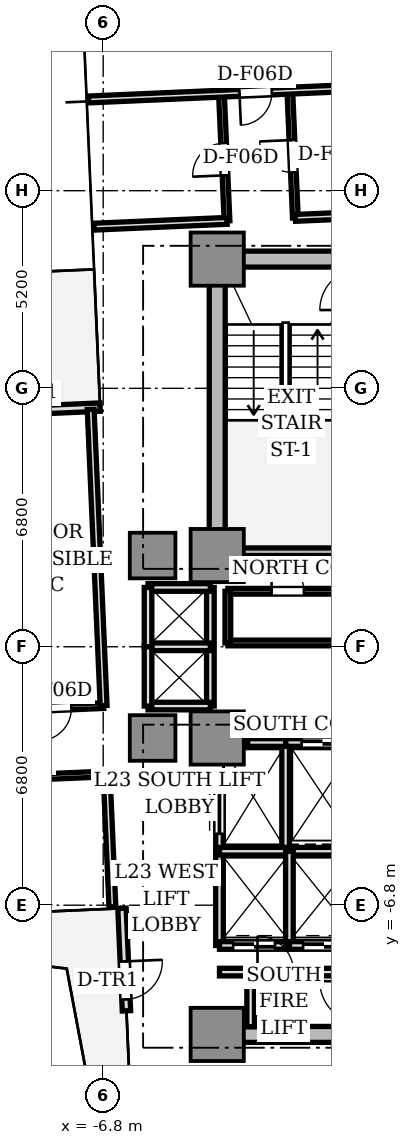
"""IFC4 building model, lengths in metres.
Left out: names, types, materials, properties, quantities, classifications, styles, units other than length and angle.
Written with IfcOpenShell. Run it as: python <this file> out.ifc"""

import sys

from ifc_helpers import new_model, si_unit, direction, frame, frame_2d, origin, origin_2d, place, context, subcontext, project, spatial, rectangle, extrude, source, transform, mapped, element, fill, save


model = new_model("IFC4")
c1 = context("Model", 3, precision=1e-05, world=origin(), true_north=direction((0.0, 1.0)))
c2 = subcontext(c1, "Body", "Model", "MODEL_VIEW")
j1 = project(units=[si_unit("LENGTHUNIT", "METRE"), si_unit("PLANEANGLEUNIT", "RADIAN")], contexts=[c1])
p1 = place(None, origin())
s1 = spatial("IfcSite", under=j1, at=p1, CompositionType="ELEMENT")
p2 = place(p1, origin())
s2 = spatial("IfcBuilding", under=s1, at=p2, CompositionType="ELEMENT")
p3 = place(p2, frame((0.0, 0.0, 86.85)))
s3 = spatial("IfcBuildingStorey", under=s2, at=p3, CompositionType="ELEMENT", Elevation=86.85)
p4 = place(p3, frame((-3.55, 10.2, 0.0), z_axis=(0.0, 0.0, 1.0), x_axis=(1.0, 0.0, 0.0)))
e1 = element("IfcWall", 1, at=p4, inside=s3, PredefinedType="SHEAR", context=c2, shape_type="SweptSolid", body=[
    extrude(rectangle(XDim=7.1, YDim=0.42, at=frame_2d((3.55, 0.0))), origin(), (0.0, 0.0, 1.0), 3.11),
])
p5 = place(p3, frame((-3.8, 2.85, 0.0), z_axis=(0.0, 0.0, 1.0), x_axis=(0.0, 1.0, 0.0)))
e2 = element("IfcWall", 2, at=p5, inside=s3, PredefinedType="SHEAR", context=c2, shape_type="SweptSolid", body=[
    extrude(rectangle(XDim=6.9, YDim=0.42, at=frame_2d((3.45, 0.0))), origin(), (0.0, 0.0, 1.0), 3.11),
])
p6 = place(p3, frame((-3.55, -10.2, 0.0), z_axis=(0.0, 0.0, 1.0), x_axis=(1.0, 0.0, 0.0)))
e3 = element("IfcWall", 3, at=p6, inside=s3, PredefinedType="SHEAR", context=c2, shape_type="SweptSolid", body=[
    extrude(rectangle(XDim=7.1, YDim=0.42, at=frame_2d((3.55, 0.0))), origin(), (0.0, 0.0, 1.0), 3.11),
])
m1 = source(origin(), c2, "Body", "SweptSolid", [
    extrude(rectangle(XDim=1.4, YDim=1.4, at=origin_2d()), origin(), (0.0, 0.0, 1.0), 3.11),
])
for number, where, z_axis, x_axis in (
    (4, (-3.8, 2.4, 0.0), (0.0, 0.0, 1.0), (1.0, 0.0, 0.0)),
    (5, (-3.8, 10.2, 0.0), (0.0, 0.0, 1.0), (1.0, 0.0, 0.0)),
    (6, (-3.8, -2.4, 0.0), (0.0, 0.0, 1.0), (1.0, 0.0, 0.0)),
    (7, (-3.8, -10.2, 0.0), (0.0, 0.0, 1.0), (1.0, 0.0, 0.0)),
):
    element("IfcColumn", number, at=place(p3, frame(where, z_axis=z_axis, x_axis=x_axis)), inside=s3, PredefinedType="COLUMN", context=c2, shape_type="MappedRepresentation", body=[
        mapped(m1, transform((0.0, 0.0, 0.0), scale=1.0)),
    ])
m2 = source(origin(), c2, "Body", "SweptSolid", [
    extrude(rectangle(XDim=1.2, YDim=1.2, at=origin_2d()), origin(), (0.0, 0.0, 1.0), 3.11),
])
for number, where, z_axis, x_axis in (
    (8, (-5.5, 2.4, 0.0), (0.0, 0.0, 1.0), (1.0, 0.0, 0.0)),
    (9, (-5.5, -2.4, 0.0), (0.0, 0.0, 1.0), (1.0, 0.0, 0.0)),
):
    element("IfcColumn", number, at=place(p3, frame(where, z_axis=z_axis, x_axis=x_axis)), inside=s3, PredefinedType="COLUMN", context=c2, shape_type="MappedRepresentation", body=[
        mapped(m2, transform((0.0, 0.0, 0.0), scale=1.0)),
    ])
p7 = place(p3, frame((-6.882, 6.306, 0.0), z_axis=(0.0, 0.0, 1.0), x_axis=(-0.999045894436, -0.043672655174, 0.0)))
e10 = element("IfcWall", 10, at=p7, inside=s3, PredefinedType="STANDARD", context=c2, shape_type="SweptSolid", body=[
    extrude(rectangle(XDim=2.7, YDim=0.22, at=frame_2d((1.35, 0.0))), origin(), (0.0, 0.0, 1.0), 3.11),
])
p8 = place(p7, frame((1.4, 0.0, 0.0)))
e11 = element("IfcOpeningElement", 11, at=p8, cuts=e10, PredefinedType="OPENING", context=c2, shape_type="SweptSolid", body=[
    extrude(rectangle(XDim=1.0, YDim=2.2, at=frame_2d((0.5, 1.1))), frame((0.0, 0.12, 0.0), z_axis=(0.0, -1.0, 0.0), x_axis=(1.0, 0.0, 0.0)), (0.0, 0.0, 1.0), 0.24),
])
p9 = place(p3, frame((-6.306, -6.882, 0.0), z_axis=(0.0, 0.0, 1.0), x_axis=(0.043672655174, -0.999045894436, 0.0)))
e12 = element("IfcWall", 12, at=p9, inside=s3, PredefinedType="STANDARD", context=c2, shape_type="SweptSolid", body=[
    extrude(rectangle(XDim=2.7, YDim=0.22, at=frame_2d((1.35, 0.0))), origin(), (0.0, 0.0, 1.0), 3.11),
])
p10 = place(p9, frame((1.4, 0.0, 0.0)))
e13 = element("IfcOpeningElement", 13, at=p10, cuts=e12, PredefinedType="OPENING", context=c2, shape_type="SweptSolid", body=[
    extrude(rectangle(XDim=1.0, YDim=2.2, at=frame_2d((0.5, 1.1))), frame((0.0, 0.12, 0.0), z_axis=(0.0, -1.0, 0.0), x_axis=(1.0, 0.0, 0.0)), (0.0, 0.0, 1.0), 0.24),
])
p11 = place(p3, frame((-3.72, 2.5, 0.0), z_axis=(0.0, 0.0, 1.0), x_axis=(1.0, 0.0, 0.0)))
e14 = element("IfcWall", 14, at=p11, inside=s3, PredefinedType="SOLIDWALL", context=c2, shape_type="SweptSolid", body=[
    extrude(rectangle(XDim=3.72, YDim=0.2, at=frame_2d((1.86, 0.0))), origin(), (0.0, 0.0, 1.0), 3.11),
])
p12 = place(p3, frame((-2.0, -5.28, 0.0), z_axis=(0.0, 0.0, 1.0), x_axis=(0.0, 1.0, 0.0)))
e15 = element("IfcWall", 15, at=p12, inside=s3, PredefinedType="SOLIDWALL", context=c2, shape_type="SweptSolid", body=[
    extrude(rectangle(XDim=2.78, YDim=0.2, at=frame_2d((1.39, 0.0))), origin(), (0.0, 0.0, 1.0), 2.66),
])
p13 = place(p3, frame((-2.0, -2.52, 0.0), z_axis=(0.0, 0.0, 1.0), x_axis=(1.0, 0.0, 0.0)))
e16 = element("IfcWall", 16, at=p13, inside=s3, PredefinedType="SOLIDWALL", context=c2, shape_type="SweptSolid", body=[
    extrude(rectangle(XDim=1.95, YDim=0.2, at=frame_2d((0.975, 0.0))), origin(), (0.0, 0.0, 1.0), 2.66),
])
p14 = place(p13, frame((0.42, 0.0, 0.0)))
e17 = element("IfcOpeningElement", 17, at=p14, cuts=e16, PredefinedType="OPENING", context=c2, shape_type="SweptSolid", body=[
    extrude(rectangle(XDim=1.1, YDim=2.2, at=frame_2d((0.55, 1.1))), frame((0.0, 0.11, 0.0), z_axis=(0.0, -1.0, 0.0), x_axis=(1.0, 0.0, 0.0)), (0.0, 0.0, 1.0), 0.22),
])
p15 = place(p3, frame((-3.0, -2.52, 0.0), z_axis=(0.0, 0.0, 1.0), x_axis=(1.0, 0.0, 0.0)))
e18 = element("IfcWall", 18, at=p15, inside=s3, PredefinedType="SOLIDWALL", context=c2, shape_type="SweptSolid", body=[
    extrude(rectangle(XDim=1.0, YDim=0.2, at=frame_2d((0.5, 0.0))), origin(), (0.0, 0.0, 1.0), 2.66),
])
p16 = place(p3, frame((-3.74, -5.36, 0.0), z_axis=(0.0, 0.0, 1.0), x_axis=(0.0, 1.0, 0.0)))
e19 = element("IfcWall", 19, at=p16, inside=s3, PredefinedType="SOLIDWALL", context=c2, shape_type="SweptSolid", body=[
    extrude(rectangle(XDim=2.08, YDim=0.2, at=frame_2d((1.04, 0.0))), origin(), (0.0, 0.0, 1.0), 2.66),
])
p17 = place(p16, frame((0.44, 0.0, 0.0)))
e20 = element("IfcOpeningElement", 20, at=p17, cuts=e19, PredefinedType="OPENING", context=c2, shape_type="SweptSolid", body=[
    extrude(rectangle(XDim=1.2, YDim=2.2, at=frame_2d((0.6, 1.1))), frame((0.0, 0.11, 0.0), z_axis=(0.0, -1.0, 0.0), x_axis=(1.0, 0.0, 0.0)), (0.0, 0.0, 1.0), 0.22),
])
p18 = place(p3, frame((-3.74, -7.86, 0.0), z_axis=(0.0, 0.0, 1.0), x_axis=(0.0, 1.0, 0.0)))
e21 = element("IfcWall", 21, at=p18, inside=s3, PredefinedType="SOLIDWALL", context=c2, shape_type="SweptSolid", body=[
    extrude(rectangle(XDim=2.48, YDim=0.2, at=frame_2d((1.24, 0.0))), origin(), (0.0, 0.0, 1.0), 2.66),
])
p19 = place(p3, frame((-3.74, -7.86, 0.0), z_axis=(0.0, 0.0, 1.0), x_axis=(1.0, 0.0, 0.0)))
e22 = element("IfcWall", 22, at=p19, inside=s3, PredefinedType="SOLIDWALL", context=c2, shape_type="SweptSolid", body=[
    extrude(rectangle(XDim=1.84, YDim=0.2, at=frame_2d((0.92, 0.0))), origin(), (0.0, 0.0, 1.0), 2.66),
])
p20 = place(p19, frame((0.36, 0.0, 0.0)))
e23 = element("IfcOpeningElement", 23, at=p20, cuts=e22, PredefinedType="OPENING", context=c2, shape_type="SweptSolid", body=[
    extrude(rectangle(XDim=1.1, YDim=2.2, at=frame_2d((0.55, 1.1))), frame((0.0, 0.11, 0.0), z_axis=(0.0, -1.0, 0.0), x_axis=(1.0, 0.0, 0.0)), (0.0, 0.0, 1.0), 0.22),
])
p21 = place(p3, frame((-3.74, -5.38, 0.0), z_axis=(0.0, 0.0, 1.0), x_axis=(1.0, 0.0, 0.0)))
e24 = element("IfcWall", 24, at=p21, inside=s3, PredefinedType="SOLIDWALL", context=c2, shape_type="SweptSolid", body=[
    extrude(rectangle(XDim=3.69, YDim=0.2, at=frame_2d((1.845, 0.0))), origin(), (0.0, 0.0, 1.0), 2.66),
])
p22 = place(p3, frame((-1.9, -7.86, 0.0), z_axis=(0.0, 0.0, 1.0), x_axis=(0.0, 1.0, 0.0)))
e25 = element("IfcWall", 25, at=p22, inside=s3, PredefinedType="SOLIDWALL", context=c2, shape_type="SweptSolid", body=[
    extrude(rectangle(XDim=2.48, YDim=0.2, at=frame_2d((1.24, 0.0))), origin(), (0.0, 0.0, 1.0), 2.66),
])
p23 = place(p3, frame((-1.9, -7.86, 0.0), z_axis=(0.0, 0.0, 1.0), x_axis=(1.0, 0.0, 0.0)))
e26 = element("IfcWall", 26, at=p23, inside=s3, PredefinedType="SOLIDWALL", context=c2, shape_type="SweptSolid", body=[
    extrude(rectangle(XDim=1.85, YDim=0.2, at=frame_2d((0.925, 0.0))), origin(), (0.0, 0.0, 1.0), 2.66),
])
p24 = place(p23, frame((0.36, 0.0, 0.0)))
e27 = element("IfcOpeningElement", 27, at=p24, cuts=e26, PredefinedType="OPENING", context=c2, shape_type="SweptSolid", body=[
    extrude(rectangle(XDim=1.1, YDim=2.2, at=frame_2d((0.55, 1.1))), frame((0.0, 0.11, 0.0), z_axis=(0.0, -1.0, 0.0), x_axis=(1.0, 0.0, 0.0)), (0.0, 0.0, 1.0), 0.22),
])
p25 = place(p3, frame((-3.98, -1.56, 0.0), z_axis=(0.0, 0.0, 1.0), x_axis=(0.0, 1.0, 0.0)))
e28 = element("IfcWall", 28, at=p25, inside=s3, PredefinedType="SOLIDWALL", context=c2, shape_type="SweptSolid", body=[
    extrude(rectangle(XDim=3.12, YDim=0.2, at=frame_2d((1.56, 0.0))), origin(), (0.0, 0.0, 1.0), 2.28),
])
for number, where, z_axis, x_axis in (
    (29, (-5.62, 1.56, 0.0), (0.0, 0.0, 1.0), (1.0, 0.0, 0.0)),
    (30, (-5.62, -1.56, 0.0), (0.0, 0.0, 1.0), (1.0, 0.0, 0.0)),
    (31, (-5.62, 0.0, 0.0), (0.0, 0.0, 1.0), (1.0, 0.0, 0.0)),
):
    element("IfcWall", number, at=place(p3, frame(where, z_axis=z_axis, x_axis=x_axis)), inside=s3, PredefinedType="SOLIDWALL", context=c2, shape_type="SweptSolid", body=[
        extrude(rectangle(XDim=1.64, YDim=0.2, at=frame_2d((0.82, 0.0))), origin(), (0.0, 0.0, 1.0), 2.66),
    ])
for number, where, z_axis, x_axis in (
    (32, (-5.62, 0.0, 0.0), (0.0, 0.0, 1.0), (0.0, 1.0, 0.0)),
    (33, (-5.62, -1.56, 0.0), (0.0, 0.0, 1.0), (0.0, 1.0, 0.0)),
):
    element("IfcWall", number, at=place(p3, frame(where, z_axis=z_axis, x_axis=x_axis)), inside=s3, PredefinedType="SOLIDWALL", context=c2, shape_type="SweptSolid", body=[
        extrude(rectangle(XDim=1.56, YDim=0.2, at=frame_2d((0.78, 0.0))), origin(), (0.0, 0.0, 1.0), 2.66),
    ])
p26 = place(p3, frame((-3.74, -8.56, 0.0), z_axis=(0.0, 0.0, 1.0), x_axis=(1.0, 0.0, 0.0)))
e34 = element("IfcWall", 34, at=p26, inside=s3, PredefinedType="SOLIDWALL", context=c2, shape_type="SweptSolid", body=[
    extrude(rectangle(XDim=3.62, YDim=0.2, at=frame_2d((1.81, 0.0))), origin(), (0.0, 0.0, 1.0), 2.66),
])
p27 = place(p26, frame((1.0, 0.0, 0.0)))
e35 = element("IfcOpeningElement", 35, at=p27, cuts=e34, PredefinedType="OPENING", context=c2, shape_type="SweptSolid", body=[
    extrude(rectangle(XDim=0.95, YDim=2.15, at=frame_2d((0.475, 1.075))), frame((0.0, 0.11, 0.0), z_axis=(0.0, -1.0, 0.0), x_axis=(1.0, 0.0, 0.0)), (0.0, 0.0, 1.0), 0.22),
])
p28 = place(p3, frame((-2.92, -10.0, 0.0), z_axis=(0.0, 0.0, 1.0), x_axis=(0.0, 1.0, 0.0)))
e36 = element("IfcWall", 36, at=p28, inside=s3, PredefinedType="SOLIDWALL", context=c2, shape_type="SweptSolid", body=[
    extrude(rectangle(XDim=1.44, YDim=0.2, at=frame_2d((0.72, 0.0))), origin(), (0.0, 0.0, 1.0), 2.66),
])
p29 = place(p3, frame((-3.52, 0.1, 0.0), z_axis=(0.0, 0.0, 1.0), x_axis=(1.0, 0.0, 0.0)))
e37 = element("IfcWall", 37, at=p29, inside=s3, PredefinedType="PARTITIONING", context=c2, shape_type="SweptSolid", body=[
    extrude(rectangle(XDim=5.68, YDim=0.15, at=frame_2d((2.84, 0.0))), origin(), (0.0, 0.0, 1.0), 2.66),
])
p30 = place(p3, frame((-3.52, 1.46, 0.0), z_axis=(0.0, 0.0, 1.0), x_axis=(1.0, 0.0, 0.0)))
e38 = element("IfcWall", 38, at=p30, inside=s3, PredefinedType="PARTITIONING", context=c2, shape_type="SweptSolid", body=[
    extrude(rectangle(XDim=5.68, YDim=0.15, at=frame_2d((2.84, 0.0))), origin(), (0.0, 0.0, 1.0), 2.66),
])
p31 = place(p30, frame((1.15, 0.0, 0.0)))
e39 = element("IfcOpeningElement", 39, at=p31, cuts=e38, PredefinedType="OPENING", context=c2, shape_type="SweptSolid", body=[
    extrude(rectangle(XDim=0.85, YDim=2.1, at=frame_2d((0.425, 1.05))), frame((0.0, 0.085, 0.0), z_axis=(0.0, -1.0, 0.0), x_axis=(1.0, 0.0, 0.0)), (0.0, 0.0, 1.0), 0.17),
])
p32 = place(p30, frame((4.15, 0.0, 0.0)))
e40 = element("IfcOpeningElement", 40, at=p32, cuts=e38, PredefinedType="OPENING", context=c2, shape_type="SweptSolid", body=[
    extrude(rectangle(XDim=0.85, YDim=2.1, at=frame_2d((0.425, 1.05))), frame((0.0, 0.085, 0.0), z_axis=(0.0, -1.0, 0.0), x_axis=(1.0, 0.0, 0.0)), (0.0, 0.0, 1.0), 0.17),
])
p33 = place(p3, frame((-3.52, 0.1, 0.0), z_axis=(0.0, 0.0, 1.0), x_axis=(0.0, 1.0, 0.0)))
e41 = element("IfcWall", 41, at=p33, inside=s3, PredefinedType="PARTITIONING", context=c2, shape_type="SweptSolid", body=[
    extrude(rectangle(XDim=1.36, YDim=0.15, at=frame_2d((0.68, 0.0))), origin(), (0.0, 0.0, 1.0), 2.28),
])
p34 = place(p3, frame((-3.542, 11.206, 0.0), z_axis=(0.0, 0.0, 1.0), x_axis=(-0.043582710367, 0.99904982226, 0.0)))
e42 = element("IfcWall", 42, at=p34, inside=s3, PredefinedType="PARTITIONING", context=c2, shape_type="SweptSolid", body=[
    extrude(rectangle(XDim=3.35, YDim=0.15, at=frame_2d((1.675, 0.0))), origin(), (0.0, 0.0, 1.0), 2.66),
])
p35 = place(p34, frame((1.2, 0.0, 0.0)))
e43 = element("IfcOpeningElement", 43, at=p35, cuts=e42, PredefinedType="OPENING", context=c2, shape_type="SweptSolid", body=[
    extrude(rectangle(XDim=0.85, YDim=2.1, at=frame_2d((0.425, 1.05))), frame((0.0, 0.085, 0.0), z_axis=(0.0, -1.0, 0.0), x_axis=(1.0, 0.0, 0.0)), (0.0, 0.0, 1.0), 0.17),
])
p36 = place(p3, frame((-1.744, 11.285, 0.0), z_axis=(0.0, 0.0, 1.0), x_axis=(-0.043579537274, 0.999049960678, 0.0)))
e44 = element("IfcWall", 44, at=p36, inside=s3, PredefinedType="PARTITIONING", context=c2, shape_type="SweptSolid", body=[
    extrude(rectangle(XDim=3.35, YDim=0.15, at=frame_2d((1.675, 0.0))), origin(), (0.0, 0.0, 1.0), 2.66),
])
p37 = place(p36, frame((1.2, 0.0, 0.0)))
e45 = element("IfcOpeningElement", 45, at=p37, cuts=e44, PredefinedType="OPENING", context=c2, shape_type="SweptSolid", body=[
    extrude(rectangle(XDim=0.85, YDim=2.1, at=frame_2d((0.425, 1.05))), frame((0.0, 0.085, 0.0), z_axis=(0.0, -1.0, 0.0), x_axis=(1.0, 0.0, 0.0)), (0.0, 0.0, 1.0), 0.17),
])
p38 = place(p3, frame((-3.542, 11.206, 0.0), z_axis=(0.0, 0.0, 1.0), x_axis=(-0.999046129111, -0.04366728647, 0.0)))
e46 = element("IfcWall", 46, at=p38, inside=s3, PredefinedType="PARTITIONING", context=c2, shape_type="SweptSolid", body=[
    extrude(rectangle(XDim=3.5, YDim=0.18, at=frame_2d((1.75, 0.0))), origin(), (0.0, 0.0, 1.0), 2.66),
])
p39 = place(p3, frame((6.049, 11.625, 0.0), z_axis=(0.0, 0.0, 1.0), x_axis=(-0.999047634936, -0.043632821702, 0.0)))
e47 = element("IfcWall", 47, at=p39, inside=s3, PredefinedType="PARTITIONING", context=c2, shape_type="SweptSolid", body=[
    extrude(rectangle(XDim=7.8, YDim=0.18, at=frame_2d((3.9, 0.0))), origin(), (0.0, 0.0, 1.0), 2.66),
])
p40 = place(p3, frame((5.903, 14.972, 0.0), z_axis=(0.0, 0.0, 1.0), x_axis=(-0.999048653727, -0.043609488494, 0.0)))
e48 = element("IfcWall", 48, at=p40, inside=s3, PredefinedType="PARTITIONING", context=c2, shape_type="SweptSolid", body=[
    extrude(rectangle(XDim=13.1, YDim=0.18, at=frame_2d((6.55, 0.0))), origin(), (0.0, 0.0, 1.0), 2.66),
])
p41 = place(p40, frame((8.275, 0.0, 0.0)))
e49 = element("IfcOpeningElement", 49, at=p41, cuts=e48, PredefinedType="OPENING", context=c2, shape_type="SweptSolid", body=[
    extrude(rectangle(XDim=0.85, YDim=2.1, at=frame_2d((0.425, 1.05))), frame((0.0, 0.1, 0.0), z_axis=(0.0, -1.0, 0.0), x_axis=(1.0, 0.0, 0.0)), (0.0, 0.0, 1.0), 0.2),
])
p42 = place(p3, frame((-6.71, -3.346, 0.0), z_axis=(0.0, 0.0, 1.0), x_axis=(-0.999048535483, -0.04361219725, 0.0)))
e50 = element("IfcWall", 50, at=p42, inside=s3, PredefinedType="PARTITIONING", context=c2, shape_type="SweptSolid", body=[
    extrude(rectangle(XDim=13.2, YDim=0.15, at=frame_2d((6.6, 0.0))), origin(), (0.0, 0.0, 1.0), 2.63),
])
p43 = place(p42, frame((1.967, 0.0, 0.0)))
e51 = element("IfcOpeningElement", 51, at=p43, cuts=e50, PredefinedType="OPENING", context=c2, shape_type="SweptSolid", body=[
    extrude(rectangle(XDim=0.85, YDim=2.1, at=frame_2d((0.425, 1.05))), frame((0.0, 0.085, 0.0), z_axis=(0.0, -1.0, 0.0), x_axis=(1.0, 0.0, 0.0)), (0.0, 0.0, 1.0), 0.17),
])
p44 = place(p42, frame((7.342, 0.0, 0.0)))
e52 = element("IfcOpeningElement", 52, at=p44, cuts=e50, PredefinedType="OPENING", context=c2, shape_type="SweptSolid", body=[
    extrude(rectangle(XDim=0.85, YDim=2.1, at=frame_2d((0.425, 1.05))), frame((0.0, 0.085, 0.0), z_axis=(0.0, -1.0, 0.0), x_axis=(1.0, 0.0, 0.0)), (0.0, 0.0, 1.0), 0.17),
])
p45 = place(p3, frame((-6.789, -1.548, 0.0), z_axis=(0.0, 0.0, 1.0), x_axis=(-0.999048500303, -0.043613003123, 0.0)))
e53 = element("IfcWall", 53, at=p45, inside=s3, PredefinedType="PARTITIONING", context=c2, shape_type="SweptSolid", body=[
    extrude(rectangle(XDim=13.2, YDim=0.15, at=frame_2d((6.6, 0.0))), origin(), (0.0, 0.0, 1.0), 2.66),
])
p46 = place(p45, frame((0.85, 0.0, 0.0)))
e54 = element("IfcOpeningElement", 54, at=p46, cuts=e53, PredefinedType="OPENING", context=c2, shape_type="SweptSolid", body=[
    extrude(rectangle(XDim=0.85, YDim=2.1, at=frame_2d((0.425, 1.05))), frame((0.0, 0.085, 0.0), z_axis=(0.0, -1.0, 0.0), x_axis=(1.0, 0.0, 0.0)), (0.0, 0.0, 1.0), 0.17),
])
p47 = place(p45, frame((6.225, 0.0, 0.0)))
e55 = element("IfcOpeningElement", 55, at=p47, cuts=e53, PredefinedType="OPENING", context=c2, shape_type="SweptSolid", body=[
    extrude(rectangle(XDim=0.85, YDim=2.1, at=frame_2d((0.425, 1.05))), frame((0.0, 0.085, 0.0), z_axis=(0.0, -1.0, 0.0), x_axis=(1.0, 0.0, 0.0)), (0.0, 0.0, 1.0), 0.17),
])
p48 = place(p3, frame((-6.71, -3.346, 0.0), z_axis=(0.0, 0.0, 1.0), x_axis=(0.043597663116, -0.999049169846, 0.0)))
e56 = element("IfcWall", 56, at=p48, inside=s3, PredefinedType="PARTITIONING", context=c2, shape_type="SweptSolid", body=[
    extrude(rectangle(XDim=3.5, YDim=0.18, at=frame_2d((1.75, 0.0))), origin(), (0.0, 0.0, 1.0), 2.66),
])
p49 = place(p3, frame((-7.129, 6.245, 0.0), z_axis=(0.0, 0.0, 1.0), x_axis=(0.043600217373, -0.999049058378, 0.0)))
e57 = element("IfcWall", 57, at=p49, inside=s3, PredefinedType="PARTITIONING", context=c2, shape_type="SweptSolid", body=[
    extrude(rectangle(XDim=7.8, YDim=0.18, at=frame_2d((3.9, 0.0))), origin(), (0.0, 0.0, 1.0), 2.66),
])
p50 = place(p3, frame((-3.851, -11.529, 0.0), z_axis=(0.0, 0.0, 1.0), x_axis=(0.999048663393, 0.043609267053, 0.0)))
e58 = element("IfcWall", 58, at=p50, inside=s3, PredefinedType="PARTITIONING", context=c2, shape_type="SweptSolid", body=[
    extrude(rectangle(XDim=10.9, YDim=0.18, at=frame_2d((5.45, 0.0))), origin(), (0.0, 0.0, 1.0), 2.66),
])
m3 = source(origin(), c2, "Body", "SweptSolid", [
    extrude(rectangle(XDim=1.0, YDim=0.05, at=origin_2d()), origin(), (0.0, 0.0, 1.0), 2.2),
])
p51 = place(p10, frame((0.5, 0.0, 0.0)))
e59 = element("IfcDoor", 59, at=p51, inside=s3, OperationType="SINGLE_SWING_LEFT", PredefinedType="DOOR", context=c2, shape_type="MappedRepresentation", body=[
    mapped(m3, transform((0.0, 0.0, 0.0), scale=1.0)),
])
fill(e13, e59)
m4 = source(origin(), c2, "Body", "SweptSolid", [
    extrude(rectangle(XDim=1.1, YDim=0.05, at=origin_2d()), origin(), (0.0, 0.0, 1.0), 2.2),
])
p52 = place(p14, frame((0.55, 0.0, 0.0)))
e60 = element("IfcDoor", 60, at=p52, inside=s3, OperationType="DOUBLE_DOOR_SLIDING", PredefinedType="DOOR", context=c2, shape_type="MappedRepresentation", body=[
    mapped(m4, transform((0.0, 0.0, 0.0), scale=1.0)),
])
fill(e17, e60)
m5 = source(origin(), c2, "Body", "SweptSolid", [
    extrude(rectangle(XDim=1.2, YDim=0.05, at=origin_2d()), origin(), (0.0, 0.0, 1.0), 2.2),
])
p53 = place(p17, frame((0.6, 0.0, 0.0)))
e61 = element("IfcDoor", 61, at=p53, inside=s3, OperationType="DOUBLE_DOOR_SLIDING", PredefinedType="DOOR", context=c2, shape_type="MappedRepresentation", body=[
    mapped(m5, transform((0.0, 0.0, 0.0), scale=1.0)),
])
fill(e20, e61)
p54 = place(p20, frame((0.55, 0.0, 0.0)))
e62 = element("IfcDoor", 62, at=p54, inside=s3, OperationType="DOUBLE_DOOR_SLIDING", PredefinedType="DOOR", context=c2, shape_type="MappedRepresentation", body=[
    mapped(m4, transform((0.0, 0.0, 0.0), scale=1.0)),
])
fill(e23, e62)
p55 = place(p24, frame((0.55, 0.0, 0.0)))
e63 = element("IfcDoor", 63, at=p55, inside=s3, OperationType="DOUBLE_DOOR_SLIDING", PredefinedType="DOOR", context=c2, shape_type="MappedRepresentation", body=[
    mapped(m4, transform((0.0, 0.0, 0.0), scale=1.0)),
])
fill(e27, e63)
m6 = source(origin(), c2, "Body", "SweptSolid", [
    extrude(rectangle(XDim=0.95, YDim=0.05, at=origin_2d()), origin(), (0.0, 0.0, 1.0), 2.15),
])
p56 = place(p27, frame((0.475, 0.0, 0.0)))
e64 = element("IfcDoor", 64, at=p56, inside=s3, OperationType="SINGLE_SWING_LEFT", PredefinedType="DOOR", context=c2, shape_type="MappedRepresentation", body=[
    mapped(m6, transform((0.0, 0.0, 0.0), scale=1.0)),
])
fill(e35, e64)
m7 = source(origin(), c2, "Body", "SweptSolid", [
    extrude(rectangle(XDim=0.85, YDim=0.05, at=origin_2d()), origin(), (0.0, 0.0, 1.0), 2.1),
])
p57 = place(p31, frame((0.425, 0.0, 0.0)))
e65 = element("IfcDoor", 65, at=p57, inside=s3, OperationType="SINGLE_SWING_LEFT", PredefinedType="DOOR", context=c2, shape_type="MappedRepresentation", body=[
    mapped(m7, transform((0.0, 0.0, 0.0), scale=1.0)),
])
fill(e39, e65)
p58 = place(p35, frame((0.425, 0.0, 0.0)))
e66 = element("IfcDoor", 66, at=p58, inside=s3, OperationType="SINGLE_SWING_LEFT", PredefinedType="DOOR", context=c2, shape_type="MappedRepresentation", body=[
    mapped(m7, transform((0.0, 0.0, 0.0), scale=1.0)),
])
fill(e43, e66)
p59 = place(p37, frame((0.425, 0.0, 0.0)))
e67 = element("IfcDoor", 67, at=p59, inside=s3, OperationType="SINGLE_SWING_RIGHT", PredefinedType="DOOR", context=c2, shape_type="MappedRepresentation", body=[
    mapped(m7, transform((0.0, 0.0, 0.0), scale=1.0)),
])
fill(e45, e67)
p60 = place(p41, frame((0.425, 0.0, 0.0)))
e68 = element("IfcDoor", 68, at=p60, inside=s3, OperationType="SINGLE_SWING_RIGHT", PredefinedType="DOOR", context=c2, shape_type="MappedRepresentation", body=[
    mapped(m7, transform((0.0, 0.0, 0.0), scale=1.0)),
])
fill(e49, e68)
p61 = place(p46, frame((0.425, 0.0, 0.0)))
e69 = element("IfcDoor", 69, at=p61, inside=s3, OperationType="SINGLE_SWING_RIGHT", PredefinedType="DOOR", context=c2, shape_type="MappedRepresentation", body=[
    mapped(m7, transform((0.0, 0.0, 0.0), scale=1.0)),
])
fill(e54, e69)
save(model, sys.argv[1])
